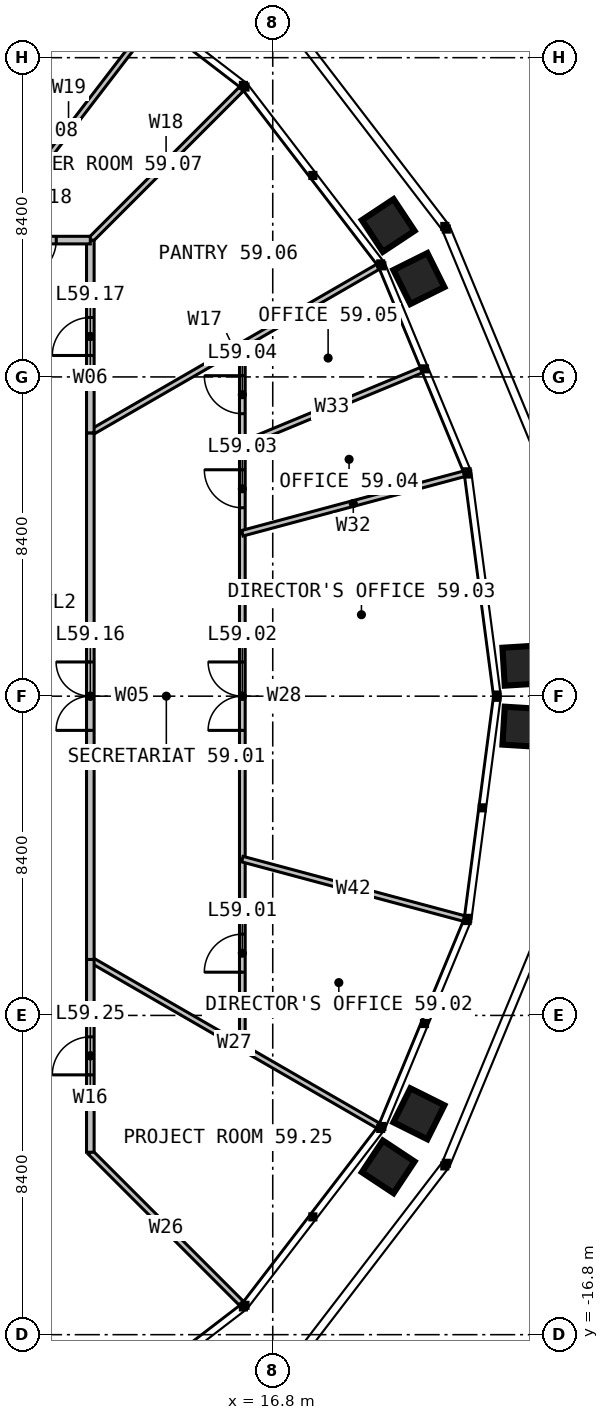
"""IFC4 building model, lengths in metres.
Left out: names, types, materials, properties, quantities, classifications, styles, units other than length and angle.
Written with IfcOpenShell. Run it as: python <this file> out.ifc"""

import sys

from ifc_helpers import new_model, si_unit, direction, frame, frame_2d, origin, place, context, subcontext, project, spatial, rectangle, extrude, element, fill, save


model = new_model("IFC4")
c1 = context("Model", 3, precision=1e-05, world=origin(), true_north=direction((0.0, 1.0)))
c2 = subcontext(c1, "Body", "Model", "MODEL_VIEW")
j1 = project(units=[si_unit("LENGTHUNIT", "METRE"), si_unit("PLANEANGLEUNIT", "RADIAN")], contexts=[c1])
p1 = place(None, origin())
s1 = spatial("IfcSite", under=j1, at=p1, CompositionType="ELEMENT")
p2 = place(p1, origin())
s2 = spatial("IfcBuilding", under=s1, at=p2, CompositionType="ELEMENT")
p3 = place(p2, frame((0.0, 0.0, 244.0)))
s3 = spatial("IfcBuildingStorey", under=s2, at=p3, CompositionType="ELEMENT", Elevation=244.0)
for number, where, z_axis, x_axis in (
    (1, (12.0, -6.928, 0.0), (0.0, 0.0, 1.0), (0.866, -0.5, 0.0)),
    (2, (12.0, 6.928, 0.0), (0.0, 0.0, 1.0), (0.866, 0.5, 0.0)),
):
    element("IfcWall", number, at=place(p3, frame(where, z_axis=z_axis, x_axis=x_axis)), inside=s3, PredefinedType="PARTITIONING", context=c2, shape_type="SweptSolid", body=[
        extrude(rectangle(XDim=8.753, YDim=0.15, at=frame_2d((4.376, 0.0))), origin(), (0.0, 0.0, 1.0), 2.79),
    ])
p4 = place(p3, frame((12.0, 12.0, 0.0), z_axis=(0.0, 0.0, 1.0), x_axis=(0.707106781187, 0.707106781187, 0.0)))
e3 = element("IfcWall", 3, at=p4, inside=s3, PredefinedType="PARTITIONING", context=c2, shape_type="SweptSolid", body=[
    extrude(rectangle(XDim=5.639, YDim=0.15, at=frame_2d((2.819, 0.0))), origin(), (0.0, 0.0, 1.0), 2.79),
])
p5 = place(p3, frame((9.208, 12.0, 0.0), z_axis=(0.0, 0.0, 1.0), x_axis=(0.608740848729, 0.793369131671, 0.0)))
e4 = element("IfcWall", 4, at=p5, inside=s3, PredefinedType="PARTITIONING", context=c2, shape_type="SweptSolid", body=[
    extrude(rectangle(XDim=7.29, YDim=0.15, at=frame_2d((3.645, 0.0))), origin(), (0.0, 0.0, 1.0), 2.79),
])
for number, where, z_axis, x_axis in (
    (5, (6.928, 12.0, 0.0), (0.0, 0.0, 1.0), (0.5, 0.866, 0.0)),
    (6, (6.928, -12.0, 0.0), (0.0, 0.0, 1.0), (0.5, -0.866, 0.0)),
):
    element("IfcWall", number, at=place(p3, frame(where, z_axis=z_axis, x_axis=x_axis)), inside=s3, PredefinedType="PARTITIONING", context=c2, shape_type="SweptSolid", body=[
        extrude(rectangle(XDim=8.753, YDim=0.15, at=frame_2d((4.376, 0.0))), origin(), (0.0, 0.0, 1.0), 2.79),
    ])
p6 = place(p3, frame((12.0, -12.0, 0.0), z_axis=(0.0, 0.0, 1.0), x_axis=(0.707106781187, -0.707106781187, 0.0)))
e7 = element("IfcWall", 7, at=p6, inside=s3, PredefinedType="PARTITIONING", context=c2, shape_type="SweptSolid", body=[
    extrude(rectangle(XDim=5.639, YDim=0.15, at=frame_2d((2.819, 0.0))), origin(), (0.0, 0.0, 1.0), 2.79),
])
p7 = place(p3, frame((16.0, -9.238, 0.0), z_axis=(0.0, 0.0, 1.0), x_axis=(0.0, 1.0, 0.0)))
e8 = element("IfcWall", 8, at=p7, inside=s3, PredefinedType="PARTITIONING", context=c2, shape_type="SweptSolid", body=[
    extrude(rectangle(XDim=18.475, YDim=0.15, at=frame_2d((9.238, 0.0))), origin(), (0.0, 0.0, 1.0), 2.79),
])
p8 = place(p7, frame((1.975, 0.0, 0.0)))
e9 = element("IfcOpeningElement", 9, at=p8, cuts=e8, PredefinedType="OPENING", context=c2, shape_type="SweptSolid", body=[
    extrude(rectangle(XDim=1.0, YDim=2.2, at=frame_2d((0.5, 1.1))), frame((0.0, 0.085, 0.0), z_axis=(0.0, -1.0, 0.0), x_axis=(1.0, 0.0, 0.0)), (0.0, 0.0, 1.0), 0.17),
])
p9 = place(p7, frame((8.338, 0.0, 0.0)))
e10 = element("IfcOpeningElement", 10, at=p9, cuts=e8, PredefinedType="OPENING", context=c2, shape_type="SweptSolid", body=[
    extrude(rectangle(XDim=1.8, YDim=2.2, at=frame_2d((0.9, 1.1))), frame((0.0, 0.085, 0.0), z_axis=(0.0, -1.0, 0.0), x_axis=(1.0, 0.0, 0.0)), (0.0, 0.0, 1.0), 0.17),
])
p10 = place(p7, frame((14.195, 0.0, 0.0)))
e11 = element("IfcOpeningElement", 11, at=p10, cuts=e8, PredefinedType="OPENING", context=c2, shape_type="SweptSolid", body=[
    extrude(rectangle(XDim=1.0, YDim=2.2, at=frame_2d((0.5, 1.1))), frame((0.0, 0.085, 0.0), z_axis=(0.0, -1.0, 0.0), x_axis=(1.0, 0.0, 0.0)), (0.0, 0.0, 1.0), 0.17),
])
p11 = place(p7, frame((16.67, 0.0, 0.0)))
e12 = element("IfcOpeningElement", 12, at=p11, cuts=e8, PredefinedType="OPENING", context=c2, shape_type="SweptSolid", body=[
    extrude(rectangle(XDim=1.0, YDim=2.2, at=frame_2d((0.5, 1.1))), frame((0.0, 0.085, 0.0), z_axis=(0.0, -1.0, 0.0), x_axis=(1.0, 0.0, 0.0)), (0.0, 0.0, 1.0), 0.17),
])
for number, where, z_axis, x_axis in (
    (13, (16.0, -4.287, 0.0), (0.0, 0.0, 1.0), (0.966, -0.259, 0.0)),
    (14, (16.0, 4.287, 0.0), (0.0, 0.0, 1.0), (0.966, 0.259, 0.0)),
):
    element("IfcWall", number, at=place(p3, frame(where, z_axis=z_axis, x_axis=x_axis)), inside=s3, PredefinedType="PARTITIONING", context=c2, shape_type="SweptSolid", body=[
        extrude(rectangle(XDim=6.045, YDim=0.15, at=frame_2d((3.022, 0.0))), origin(), (0.0, 0.0, 1.0), 2.79),
    ])
p12 = place(p3, frame((16.0, 6.627, 0.0), z_axis=(0.0, 0.0, 1.0), x_axis=(0.923882573996, 0.382676089488, 0.0)))
e15 = element("IfcWall", 15, at=p12, inside=s3, PredefinedType="PARTITIONING", context=c2, shape_type="SweptSolid", body=[
    extrude(rectangle(XDim=5.097, YDim=0.15, at=frame_2d((2.549, 0.0))), origin(), (0.0, 0.0, 1.0), 2.79),
])
p13 = place(p3, frame((12.0, -6.928, 0.0), z_axis=(0.0, 0.0, 1.0), x_axis=(0.0, 1.0, 0.0)))
e16 = element("IfcWall", 16, at=p13, inside=s3, PredefinedType="PARTITIONING", context=c2, shape_type="SweptSolid", body=[
    extrude(rectangle(XDim=13.856, YDim=0.2, at=frame_2d((6.928, 0.0))), origin(), (0.0, 0.0, 1.0), 3.8),
])
p14 = place(p13, frame((6.028, 0.0, 0.0)))
e17 = element("IfcOpeningElement", 17, at=p14, cuts=e16, PredefinedType="OPENING", context=c2, shape_type="SweptSolid", body=[
    extrude(rectangle(XDim=1.8, YDim=2.2, at=frame_2d((0.9, 1.1))), frame((0.0, 0.11, 0.0), z_axis=(0.0, -1.0, 0.0), x_axis=(1.0, 0.0, 0.0)), (0.0, 0.0, 1.0), 0.22),
])
p15 = place(p3, frame((12.0, 6.928, 0.0), z_axis=(0.0, 0.0, 1.0), x_axis=(0.0, 1.0, 0.0)))
e18 = element("IfcWall", 18, at=p15, inside=s3, PredefinedType="PARTITIONING", context=c2, shape_type="SweptSolid", body=[
    extrude(rectangle(XDim=5.072, YDim=0.2, at=frame_2d((2.536, 0.0))), origin(), (0.0, 0.0, 1.0), 3.8),
])
p16 = place(p15, frame((2.036, 0.0, 0.0)))
e19 = element("IfcOpeningElement", 19, at=p16, cuts=e18, PredefinedType="OPENING", context=c2, shape_type="SweptSolid", body=[
    extrude(rectangle(XDim=1.0, YDim=2.2, at=frame_2d((0.5, 1.1))), frame((0.0, 0.11, 0.0), z_axis=(0.0, -1.0, 0.0), x_axis=(1.0, 0.0, 0.0)), (0.0, 0.0, 1.0), 0.22),
])
p17 = place(p3, frame((12.0, 12.0, 0.0), z_axis=(0.0, 0.0, 1.0), x_axis=(-1.0, 0.0, 0.0)))
e20 = element("IfcWall", 20, at=p17, inside=s3, PredefinedType="PARTITIONING", context=c2, shape_type="SweptSolid", body=[
    extrude(rectangle(XDim=2.792, YDim=0.2, at=frame_2d((1.396, 0.0))), origin(), (0.0, 0.0, 1.0), 3.8),
])
p18 = place(p17, frame((0.896, 0.0, 0.0)))
e21 = element("IfcOpeningElement", 21, at=p18, cuts=e20, PredefinedType="OPENING", context=c2, shape_type="SweptSolid", body=[
    extrude(rectangle(XDim=1.0, YDim=2.2, at=frame_2d((0.5, 1.1))), frame((0.0, 0.11, 0.0), z_axis=(0.0, -1.0, 0.0), x_axis=(1.0, 0.0, 0.0)), (0.0, 0.0, 1.0), 0.22),
])
p19 = place(p3, frame((12.0, -12.0, 0.0), z_axis=(0.0, 0.0, 1.0), x_axis=(0.0, 1.0, 0.0)))
e22 = element("IfcWall", 22, at=p19, inside=s3, PredefinedType="PARTITIONING", context=c2, shape_type="SweptSolid", body=[
    extrude(rectangle(XDim=5.072, YDim=0.2, at=frame_2d((2.536, 0.0))), origin(), (0.0, 0.0, 1.0), 3.8),
])
p20 = place(p19, frame((2.036, 0.0, 0.0)))
e23 = element("IfcOpeningElement", 23, at=p20, cuts=e22, PredefinedType="OPENING", context=c2, shape_type="SweptSolid", body=[
    extrude(rectangle(XDim=1.0, YDim=2.2, at=frame_2d((0.5, 1.1))), frame((0.0, 0.11, 0.0), z_axis=(0.0, -1.0, 0.0), x_axis=(1.0, 0.0, 0.0)), (0.0, 0.0, 1.0), 0.22),
])
p21 = place(p8, origin())
e24 = element("IfcDoor", 24, at=p21, inside=s3, OperationType="SINGLE_SWING_LEFT", PredefinedType="DOOR", context=c2, shape_type="SweptSolid", body=[
    extrude(rectangle(XDim=1.0, YDim=2.2, at=frame_2d((0.5, 1.1))), frame((0.0, 0.025, 0.0), z_axis=(0.0, -1.0, 0.0), x_axis=(1.0, 0.0, 0.0)), (0.0, 0.0, 1.0), 0.05),
])
fill(e9, e24)
p22 = place(p9, origin())
e25 = element("IfcDoor", 25, at=p22, inside=s3, OperationType="DOUBLE_DOOR_SINGLE_SWING", PredefinedType="DOOR", context=c2, shape_type="SweptSolid", body=[
    extrude(rectangle(XDim=1.8, YDim=2.2, at=frame_2d((0.9, 1.1))), frame((0.0, 0.025, 0.0), z_axis=(0.0, -1.0, 0.0), x_axis=(1.0, 0.0, 0.0)), (0.0, 0.0, 1.0), 0.05),
])
fill(e10, e25)
p23 = place(p10, origin())
e26 = element("IfcDoor", 26, at=p23, inside=s3, OperationType="SINGLE_SWING_RIGHT", PredefinedType="DOOR", context=c2, shape_type="SweptSolid", body=[
    extrude(rectangle(XDim=1.0, YDim=2.2, at=frame_2d((0.5, 1.1))), frame((0.0, 0.025, 0.0), z_axis=(0.0, -1.0, 0.0), x_axis=(1.0, 0.0, 0.0)), (0.0, 0.0, 1.0), 0.05),
])
fill(e11, e26)
p24 = place(p11, origin())
e27 = element("IfcDoor", 27, at=p24, inside=s3, OperationType="SINGLE_SWING_RIGHT", PredefinedType="DOOR", context=c2, shape_type="SweptSolid", body=[
    extrude(rectangle(XDim=1.0, YDim=2.2, at=frame_2d((0.5, 1.1))), frame((0.0, 0.025, 0.0), z_axis=(0.0, -1.0, 0.0), x_axis=(1.0, 0.0, 0.0)), (0.0, 0.0, 1.0), 0.05),
])
fill(e12, e27)
p25 = place(p14, origin())
e28 = element("IfcDoor", 28, at=p25, inside=s3, OperationType="DOUBLE_DOOR_SINGLE_SWING", PredefinedType="DOOR", context=c2, shape_type="SweptSolid", body=[
    extrude(rectangle(XDim=1.8, YDim=2.2, at=frame_2d((0.9, 1.1))), frame((0.0, 0.025, 0.0), z_axis=(0.0, -1.0, 0.0), x_axis=(1.0, 0.0, 0.0)), (0.0, 0.0, 1.0), 0.05),
])
fill(e17, e28)
p26 = place(p16, origin())
e29 = element("IfcDoor", 29, at=p26, inside=s3, OperationType="SINGLE_SWING_LEFT", PredefinedType="DOOR", context=c2, shape_type="SweptSolid", body=[
    extrude(rectangle(XDim=1.0, YDim=2.2, at=frame_2d((0.5, 1.1))), frame((0.0, 0.025, 0.0), z_axis=(0.0, -1.0, 0.0), x_axis=(1.0, 0.0, 0.0)), (0.0, 0.0, 1.0), 0.05),
])
fill(e19, e29)
p27 = place(p18, origin())
e30 = element("IfcDoor", 30, at=p27, inside=s3, OperationType="SINGLE_SWING_RIGHT", PredefinedType="DOOR", context=c2, shape_type="SweptSolid", body=[
    extrude(rectangle(XDim=1.0, YDim=2.2, at=frame_2d((0.5, 1.1))), frame((0.0, 0.025, 0.0), z_axis=(0.0, -1.0, 0.0), x_axis=(1.0, 0.0, 0.0)), (0.0, 0.0, 1.0), 0.05),
])
fill(e21, e30)
p28 = place(p20, origin())
e31 = element("IfcDoor", 31, at=p28, inside=s3, OperationType="SINGLE_SWING_LEFT", PredefinedType="DOOR", context=c2, shape_type="SweptSolid", body=[
    extrude(rectangle(XDim=1.0, YDim=2.2, at=frame_2d((0.5, 1.1))), frame((0.0, 0.025, 0.0), z_axis=(0.0, -1.0, 0.0), x_axis=(1.0, 0.0, 0.0)), (0.0, 0.0, 1.0), 0.05),
])
fill(e23, e31)
save(model, sys.argv[1])
